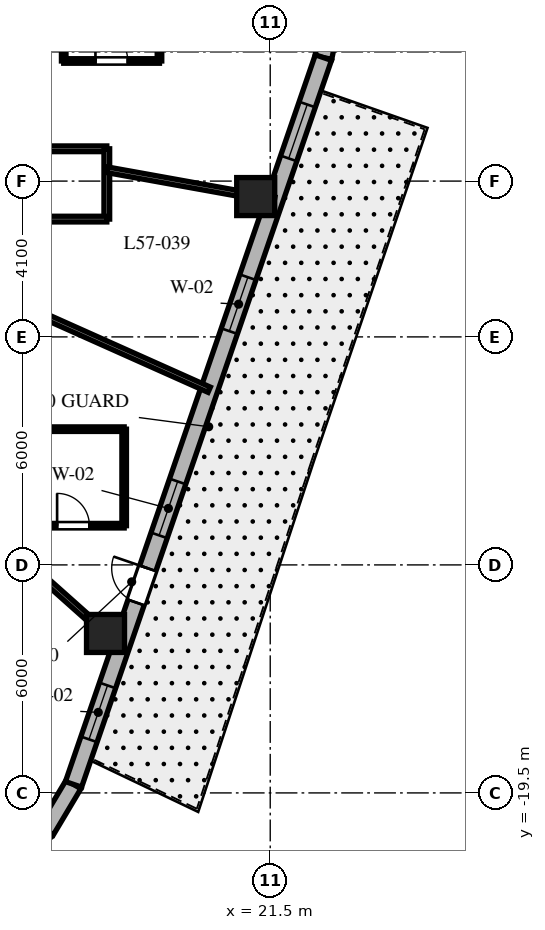
"""IFC4 building model, lengths in metres.
Left out: names, types, materials, properties, quantities, classifications, styles, units other than length and angle.
Written with IfcOpenShell. Run it as: python <this file> out.ifc"""

import sys

from ifc_helpers import new_model, si_unit, direction, frame, frame_2d, origin, origin_2d, place, context, subcontext, project, spatial, rectangle, extrude, element, fill, save


model = new_model("IFC4")
c1 = context("Model", 3, precision=1e-05, world=origin(), true_north=direction((0.0, 1.0)))
c2 = subcontext(c1, "Body", "Model", "MODEL_VIEW")
j1 = project(units=[si_unit("LENGTHUNIT", "METRE"), si_unit("PLANEANGLEUNIT", "RADIAN")], contexts=[c1])
p1 = place(None, origin())
s1 = spatial("IfcSite", under=j1, at=p1, CompositionType="ELEMENT")
p2 = place(p1, origin())
s2 = spatial("IfcBuilding", under=s1, at=p2, CompositionType="ELEMENT")
p3 = place(p2, frame((0.0, 0.0, 229.3)))
s3 = spatial("IfcBuildingStorey", under=s2, at=p3, CompositionType="ELEMENT", Elevation=229.3)
for number, where, z_axis, x_axis in (
    (1, (17.166, -15.304, 0.0), (0.0, 0.0, 1.0), (1.0, 0.0, 0.0)),
    (2, (21.118, -3.807, 0.0), (0.0, 0.0, 1.0), (1.0, 0.0, 0.0)),
):
    element("IfcColumn", number, at=place(p3, frame(where, z_axis=z_axis, x_axis=x_axis)), inside=s3, PredefinedType="COLUMN", context=c2, shape_type="SweptSolid", body=[
        extrude(rectangle(XDim=1.0, YDim=1.0, at=origin_2d()), origin(), (0.0, 0.0, 1.0), 3.8),
    ])
p4 = place(p3, frame((15.604, -20.483, 0.0), z_axis=(0.0, 0.0, 1.0), x_axis=(0.512222149036, 0.858852996756, 0.0)))
e3 = element("IfcWall", 3, at=p4, inside=s3, PredefinedType="SOLIDWALL", context=c2, shape_type="SweptSolid", body=[
    extrude(rectangle(XDim=1.406, YDim=0.45, at=frame_2d((0.703, 0.0))), origin(), (0.0, 0.0, 1.0), 3.5),
])
p5 = place(p3, frame((22.898, -0.15, 0.0), z_axis=(0.0, 0.0, 1.0), x_axis=(0.199055826889, 0.979988151858, 0.0)))
e4 = element("IfcWall", 4, at=p5, inside=s3, PredefinedType="SOLIDWALL", context=c2, shape_type="SweptSolid", body=[
    extrude(rectangle(XDim=0.894, YDim=0.45, at=frame_2d((0.447, 0.0))), origin(), (0.0, 0.0, 1.0), 3.5),
])
p6 = place(p3, frame((16.324, -19.275, 0.0), z_axis=(0.0, 0.0, 1.0), x_axis=(0.325083142304, 0.945685439557, 0.0)))
e5 = element("IfcWall", 5, at=p6, inside=s3, PredefinedType="SOLIDWALL", context=c2, shape_type="SweptSolid", body=[
    extrude(rectangle(XDim=20.224, YDim=0.45, at=frame_2d((10.112, 0.0))), origin(), (0.0, 0.0, 1.0), 3.5),
])
p7 = place(p6, frame((5.062, 0.0, 0.0)))
e6 = element("IfcOpeningElement", 6, at=p7, cuts=e5, PredefinedType="OPENING", context=c2, shape_type="SweptSolid", body=[
    extrude(rectangle(XDim=0.95, YDim=2.15, at=frame_2d((0.475, 1.075))), frame((0.0, 0.235, 0.0), z_axis=(0.0, -1.0, 0.0), x_axis=(1.0, 0.0, 0.0)), (0.0, 0.0, 1.0), 0.47),
])
p8 = place(p6, frame((1.253, 0.0, 0.8)))
e7 = element("IfcOpeningElement", 7, at=p8, cuts=e5, PredefinedType="OPENING", context=c2, shape_type="SweptSolid", body=[
    extrude(rectangle(XDim=1.5, YDim=1.8, at=frame_2d((0.75, 0.9))), frame((0.0, 0.235, 0.0), z_axis=(0.0, -1.0, 0.0), x_axis=(1.0, 0.0, 0.0)), (0.0, 0.0, 1.0), 0.47),
])
p9 = place(p6, frame((6.929, 0.0, 0.8)))
e8 = element("IfcOpeningElement", 8, at=p9, cuts=e5, PredefinedType="OPENING", context=c2, shape_type="SweptSolid", body=[
    extrude(rectangle(XDim=1.5, YDim=1.8, at=frame_2d((0.75, 0.9))), frame((0.0, 0.235, 0.0), z_axis=(0.0, -1.0, 0.0), x_axis=(1.0, 0.0, 0.0)), (0.0, 0.0, 1.0), 0.47),
])
p10 = place(p6, frame((12.612, 0.0, 0.8)))
e9 = element("IfcOpeningElement", 9, at=p10, cuts=e5, PredefinedType="OPENING", context=c2, shape_type="SweptSolid", body=[
    extrude(rectangle(XDim=1.5, YDim=1.8, at=frame_2d((0.75, 0.9))), frame((0.0, 0.235, 0.0), z_axis=(0.0, -1.0, 0.0), x_axis=(1.0, 0.0, 0.0)), (0.0, 0.0, 1.0), 0.47),
])
p11 = place(p6, frame((17.418, 0.0, 0.8)))
e10 = element("IfcOpeningElement", 10, at=p11, cuts=e5, PredefinedType="OPENING", context=c2, shape_type="SweptSolid", body=[
    extrude(rectangle(XDim=1.5, YDim=1.8, at=frame_2d((0.75, 0.9))), frame((0.0, 0.235, 0.0), z_axis=(0.0, -1.0, 0.0), x_axis=(1.0, 0.0, 0.0)), (0.0, 0.0, 1.0), 0.47),
])
p12 = place(p3, frame((11.35, -2.55, 0.0), z_axis=(0.0, 0.0, 1.0), x_axis=(1.0, 0.0, 0.0)))
e11 = element("IfcWall", 11, at=p12, inside=s3, PredefinedType="PARTITIONING", context=c2, shape_type="SweptSolid", body=[
    extrude(rectangle(XDim=5.85, YDim=0.15, at=frame_2d((2.925, 0.0))), origin(), (0.0, 0.0, 1.0), 2.94),
])
p13 = place(p3, frame((17.2, -2.55, 0.0), z_axis=(0.0, 0.0, 1.0), x_axis=(0.0, -1.0, 0.0)))
e12 = element("IfcWall", 12, at=p13, inside=s3, PredefinedType="PARTITIONING", context=c2, shape_type="SweptSolid", body=[
    extrude(rectangle(XDim=1.85, YDim=0.15, at=frame_2d((0.925, 0.0))), origin(), (0.0, 0.0, 1.0), 2.94),
])
p14 = place(p3, frame((17.2, -4.4, 0.0), z_axis=(0.0, 0.0, 1.0), x_axis=(-1.0, 0.0, 0.0)))
e13 = element("IfcWall", 13, at=p14, inside=s3, PredefinedType="PARTITIONING", context=c2, shape_type="SweptSolid", body=[
    extrude(rectangle(XDim=5.85, YDim=0.15, at=frame_2d((2.925, 0.0))), origin(), (0.0, 0.0, 1.0), 2.94),
])
p15 = place(p14, frame((2.475, 0.0, 0.0)))
e14 = element("IfcOpeningElement", 14, at=p15, cuts=e13, PredefinedType="OPENING", context=c2, shape_type="SweptSolid", body=[
    extrude(rectangle(XDim=0.9, YDim=2.03, at=frame_2d((0.45, 1.015))), frame((0.0, 0.085, 0.0), z_axis=(0.0, -1.0, 0.0), x_axis=(1.0, 0.0, 0.0)), (0.0, 0.0, 1.0), 0.17),
])
p16 = place(p3, frame((11.048, -9.85, 0.0), z_axis=(0.0, 0.0, 1.0), x_axis=(0.746444434655, -0.665447748492, 0.0)))
e15 = element("IfcWall", 15, at=p16, inside=s3, PredefinedType="PARTITIONING", context=c2, shape_type="SweptSolid", body=[
    extrude(rectangle(XDim=8.732, YDim=0.15, at=frame_2d((4.366, 0.0))), origin(), (0.0, 0.0, 1.0), 2.74),
])
p17 = place(p3, frame((11.35, -5.072, 0.0), z_axis=(0.0, 0.0, 1.0), x_axis=(0.912980177983, -0.408003914944, 0.0)))
e16 = element("IfcWall", 16, at=p17, inside=s3, PredefinedType="PARTITIONING", context=c2, shape_type="SweptSolid", body=[
    extrude(rectangle(XDim=9.358, YDim=0.15, at=frame_2d((4.679, 0.0))), origin(), (0.0, 0.0, 1.0), 2.74),
])
p18 = place(p3, frame((17.2, -3.101, 0.0), z_axis=(0.0, 0.0, 1.0), x_axis=(0.98413465883, -0.177423147559, 0.0)))
e17 = element("IfcWall", 17, at=p18, inside=s3, PredefinedType="PARTITIONING", context=c2, shape_type="SweptSolid", body=[
    extrude(rectangle(XDim=4.482, YDim=0.15, at=frame_2d((2.241, 0.0))), origin(), (0.0, 0.0, 1.0), 2.74),
])
p19 = place(p3, frame((14.977, -12.468, 0.0), z_axis=(0.0, 0.0, 1.0), x_axis=(1.0, 0.0, 0.0)))
e18 = element("IfcWall", 18, at=p19, inside=s3, PredefinedType="PARTITIONING", context=c2, shape_type="SweptSolid", body=[
    extrude(rectangle(XDim=2.68, YDim=0.12, at=frame_2d((1.34, 0.0))), origin(), (0.0, 0.0, 1.0), 3.5),
])
p20 = place(p19, frame((0.915, 0.0, 0.0)))
e19 = element("IfcOpeningElement", 19, at=p20, cuts=e18, PredefinedType="OPENING", context=c2, shape_type="SweptSolid", body=[
    extrude(rectangle(XDim=0.85, YDim=2.03, at=frame_2d((0.425, 1.015))), frame((0.0, 0.07, 0.0), z_axis=(0.0, -1.0, 0.0), x_axis=(1.0, 0.0, 0.0)), (0.0, 0.0, 1.0), 0.14),
])
p21 = place(p3, frame((17.657, -12.468, 0.0), z_axis=(0.0, 0.0, 1.0), x_axis=(0.0, 1.0, 0.0)))
e20 = element("IfcWall", 20, at=p21, inside=s3, PredefinedType="PARTITIONING", context=c2, shape_type="SweptSolid", body=[
    extrude(rectangle(XDim=2.54, YDim=0.12, at=frame_2d((1.27, 0.0))), origin(), (0.0, 0.0, 1.0), 3.5),
])
p22 = place(p3, frame((17.657, -9.928, 0.0), z_axis=(0.0, 0.0, 1.0), x_axis=(-1.0, 0.0, 0.0)))
e21 = element("IfcWall", 21, at=p22, inside=s3, PredefinedType="PARTITIONING", context=c2, shape_type="SweptSolid", body=[
    extrude(rectangle(XDim=2.68, YDim=0.12, at=frame_2d((1.34, 0.0))), origin(), (0.0, 0.0, 1.0), 3.072),
])
p23 = place(p3, frame((16.066, -0.239, 0.0), z_axis=(0.0, 0.0, 1.0), x_axis=(1.0, 0.0, 0.0)))
e22 = element("IfcWall", 22, at=p23, inside=s3, PredefinedType="PARTITIONING", context=c2, shape_type="SweptSolid", body=[
    extrude(rectangle(XDim=2.52, YDim=0.12, at=frame_2d((1.26, 0.0))), origin(), (0.0, 0.0, 1.0), 2.94),
])
p24 = place(p23, frame((0.835, 0.0, 0.0)))
e23 = element("IfcOpeningElement", 23, at=p24, cuts=e22, PredefinedType="OPENING", context=c2, shape_type="SweptSolid", body=[
    extrude(rectangle(XDim=0.85, YDim=2.03, at=frame_2d((0.425, 1.015))), frame((0.0, 0.07, 0.0), z_axis=(0.0, -1.0, 0.0), x_axis=(1.0, 0.0, 0.0)), (0.0, 0.0, 1.0), 0.14),
])
for number, where, z_axis, x_axis in (
    (24, (18.586, -0.239, 0.0), (0.0, 0.0, 1.0), (0.0, 1.0, 0.0)),
    (25, (16.066, 2.441, 0.0), (0.0, 0.0, 1.0), (0.0, -1.0, 0.0)),
):
    element("IfcWall", number, at=place(p3, frame(where, z_axis=z_axis, x_axis=x_axis)), inside=s3, PredefinedType="PARTITIONING", context=c2, shape_type="SweptSolid", body=[
        extrude(rectangle(XDim=2.68, YDim=0.12, at=frame_2d((1.34, 0.0))), origin(), (0.0, 0.0, 1.0), 3.5),
    ])
p25 = place(p7, origin())
e26 = element("IfcDoor", 26, at=p25, inside=s3, OperationType="SINGLE_SWING_RIGHT", PredefinedType="DOOR", context=c2, shape_type="SweptSolid", body=[
    extrude(rectangle(XDim=0.95, YDim=2.15, at=frame_2d((0.475, 1.075))), frame((0.0, 0.025, 0.0), z_axis=(0.0, -1.0, 0.0), x_axis=(1.0, 0.0, 0.0)), (0.0, 0.0, 1.0), 0.05),
])
fill(e6, e26)
p26 = place(p8, origin())
e27 = element("IfcWindow", 27, at=p26, inside=s3, PartitioningType="SINGLE_PANEL", PredefinedType="WINDOW", context=c2, shape_type="SweptSolid", body=[
    extrude(rectangle(XDim=1.5, YDim=1.8, at=frame_2d((0.75, 0.9))), frame((0.0, 0.03, 0.0), z_axis=(0.0, -1.0, 0.0), x_axis=(1.0, 0.0, 0.0)), (0.0, 0.0, 1.0), 0.06),
])
fill(e7, e27)
p27 = place(p9, origin())
e28 = element("IfcWindow", 28, at=p27, inside=s3, PartitioningType="SINGLE_PANEL", PredefinedType="WINDOW", context=c2, shape_type="SweptSolid", body=[
    extrude(rectangle(XDim=1.5, YDim=1.8, at=frame_2d((0.75, 0.9))), frame((0.0, 0.03, 0.0), z_axis=(0.0, -1.0, 0.0), x_axis=(1.0, 0.0, 0.0)), (0.0, 0.0, 1.0), 0.06),
])
fill(e8, e28)
p28 = place(p10, origin())
e29 = element("IfcWindow", 29, at=p28, inside=s3, PartitioningType="SINGLE_PANEL", PredefinedType="WINDOW", context=c2, shape_type="SweptSolid", body=[
    extrude(rectangle(XDim=1.5, YDim=1.8, at=frame_2d((0.75, 0.9))), frame((0.0, 0.03, 0.0), z_axis=(0.0, -1.0, 0.0), x_axis=(1.0, 0.0, 0.0)), (0.0, 0.0, 1.0), 0.06),
])
fill(e9, e29)
p29 = place(p11, origin())
e30 = element("IfcWindow", 30, at=p29, inside=s3, PartitioningType="SINGLE_PANEL", PredefinedType="WINDOW", context=c2, shape_type="SweptSolid", body=[
    extrude(rectangle(XDim=1.5, YDim=1.8, at=frame_2d((0.75, 0.9))), frame((0.0, 0.03, 0.0), z_axis=(0.0, -1.0, 0.0), x_axis=(1.0, 0.0, 0.0)), (0.0, 0.0, 1.0), 0.06),
])
fill(e10, e30)
p30 = place(p20, origin())
e31 = element("IfcDoor", 31, at=p30, inside=s3, OperationType="SINGLE_SWING_LEFT", PredefinedType="DOOR", context=c2, shape_type="SweptSolid", body=[
    extrude(rectangle(XDim=0.85, YDim=2.03, at=frame_2d((0.425, 1.015))), frame((0.0, 0.025, 0.0), z_axis=(0.0, -1.0, 0.0), x_axis=(1.0, 0.0, 0.0)), (0.0, 0.0, 1.0), 0.05),
])
fill(e19, e31)
p31 = place(p24, origin())
e32 = element("IfcDoor", 32, at=p31, inside=s3, OperationType="SINGLE_SWING_LEFT", PredefinedType="DOOR", context=c2, shape_type="SweptSolid", body=[
    extrude(rectangle(XDim=0.85, YDim=2.03, at=frame_2d((0.425, 1.015))), frame((0.0, 0.025, 0.0), z_axis=(0.0, -1.0, 0.0), x_axis=(1.0, 0.0, 0.0)), (0.0, 0.0, 1.0), 0.05),
])
fill(e23, e32)
save(model, sys.argv[1])
